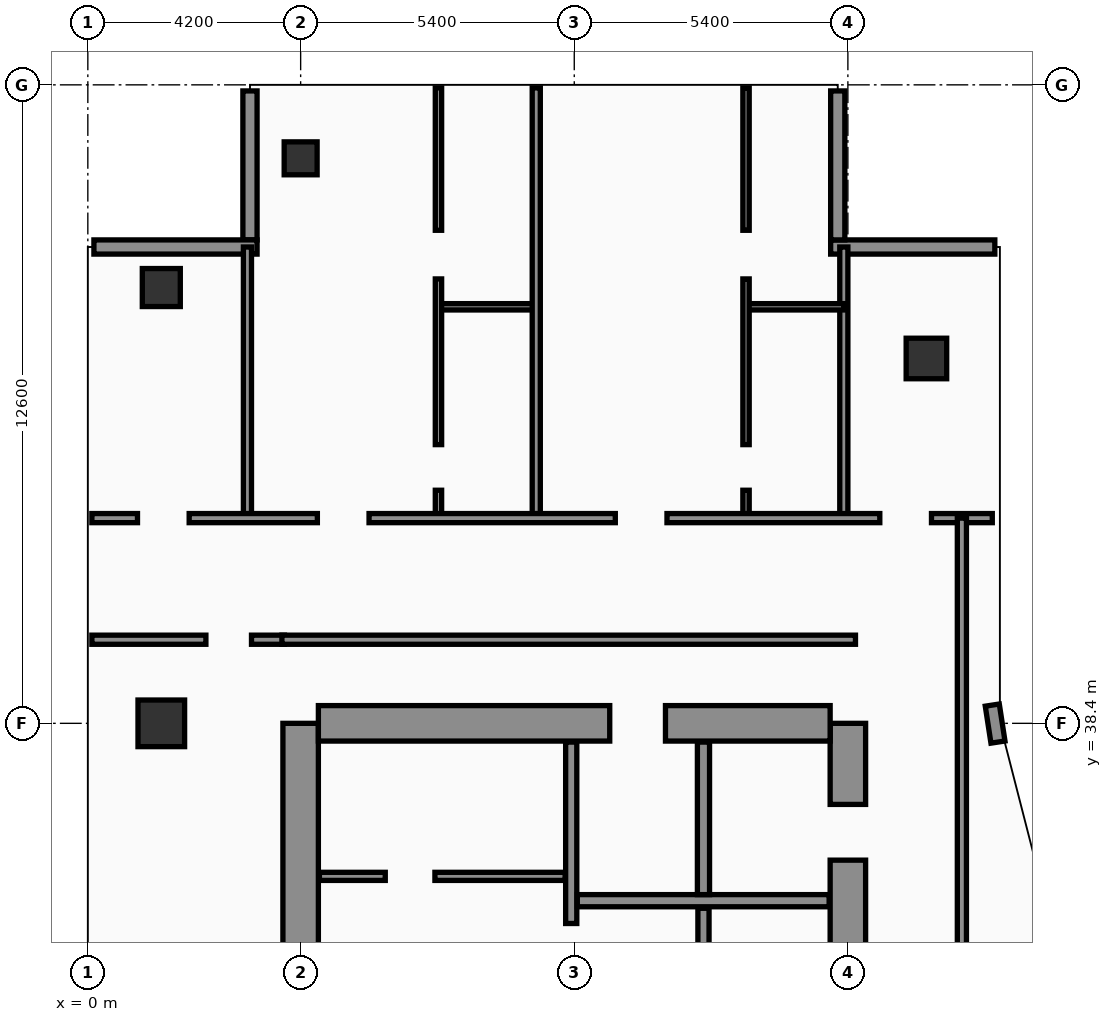
"""IFC4 building model, lengths in metres.
Left out: names, types, materials, properties, quantities, classifications, styles, units other than length and angle.
Written with IfcOpenShell. Run it as: python <this file> out.ifc"""

import sys

from ifc_helpers import new_model, si_unit, direction, frame, frame_2d, origin, origin_2d, place, context, subcontext, project, spatial, rectangle, hollow_rectangle, extrude, element, fill, save


model = new_model("IFC4")
c1 = context("Model", 3, precision=1e-05, world=origin(), true_north=direction((0.0, 1.0)))
c2 = subcontext(c1, "Body", "Model", "MODEL_VIEW")
j1 = project(units=[si_unit("LENGTHUNIT", "METRE"), si_unit("PLANEANGLEUNIT", "RADIAN")], contexts=[c1])
p1 = place(None, origin())
s1 = spatial("IfcSite", under=j1, at=p1, CompositionType="ELEMENT")
p2 = place(p1, origin())
s2 = spatial("IfcBuilding", under=s1, at=p2, CompositionType="ELEMENT")
p3 = place(p2, frame((0.0, 0.0, 251.4)))
s3 = spatial("IfcBuildingStorey", under=s2, at=p3, CompositionType="ELEMENT", Elevation=251.4)
p4 = place(p3, frame((4.2, 16.8, 0.0), z_axis=(0.0, 0.0, 1.0), x_axis=(0.0, 1.0, 0.0)))
e1 = element("IfcWall", 1, at=p4, inside=s3, PredefinedType="SHEAR", context=c2, shape_type="SweptSolid", body=[
    extrude(rectangle(XDim=21.6, YDim=0.7, at=frame_2d((10.8, 0.0))), origin(), (0.0, 0.0, 1.0), 3.56),
])
p5 = place(p3, frame((15.0, 16.8, 0.0), z_axis=(0.0, 0.0, 1.0), x_axis=(0.0, 1.0, 0.0)))
e2 = element("IfcWall", 2, at=p5, inside=s3, PredefinedType="SHEAR", context=c2, shape_type="SweptSolid", body=[
    extrude(rectangle(XDim=21.6, YDim=0.7, at=frame_2d((10.8, 0.0))), origin(), (0.0, 0.0, 1.0), 3.56),
])
p6 = place(p5, frame((8.65, 0.0, 0.0)))
e3 = element("IfcOpeningElement", 3, at=p6, cuts=e2, PredefinedType="OPENING", context=c2, shape_type="SweptSolid", body=[
    extrude(rectangle(XDim=1.1, YDim=2.2, at=frame_2d((0.55, 1.1))), frame((0.0, 0.36, 0.0), z_axis=(0.0, -1.0, 0.0), x_axis=(1.0, 0.0, 0.0)), (0.0, 0.0, 1.0), 0.72),
])
p7 = place(p5, frame((18.9, 0.0, 0.0)))
e4 = element("IfcOpeningElement", 4, at=p7, cuts=e2, PredefinedType="OPENING", context=c2, shape_type="SweptSolid", body=[
    extrude(rectangle(XDim=1.1, YDim=2.2, at=frame_2d((0.55, 1.1))), frame((0.0, 0.36, 0.0), z_axis=(0.0, -1.0, 0.0), x_axis=(1.0, 0.0, 0.0)), (0.0, 0.0, 1.0), 0.72),
])
p8 = place(p3, frame((4.55, 38.4, 0.0), z_axis=(0.0, 0.0, 1.0), x_axis=(1.0, 0.0, 0.0)))
e5 = element("IfcWall", 5, at=p8, inside=s3, PredefinedType="SHEAR", context=c2, shape_type="SweptSolid", body=[
    extrude(rectangle(XDim=10.1, YDim=0.7, at=frame_2d((5.05, 0.0))), origin(), (0.0, 0.0, 1.0), 3.56),
])
p9 = place(p8, frame((5.75, 0.0, 0.0)))
e6 = element("IfcOpeningElement", 6, at=p9, cuts=e5, PredefinedType="OPENING", context=c2, shape_type="SweptSolid", body=[
    extrude(rectangle(XDim=1.1, YDim=2.2, at=frame_2d((0.55, 1.1))), frame((0.0, 0.36, 0.0), z_axis=(0.0, -1.0, 0.0), x_axis=(1.0, 0.0, 0.0)), (0.0, 0.0, 1.0), 0.72),
])
p10 = place(p3, frame((1.45, 38.4, 0.0), z_axis=(0.0, 0.0, 1.0), x_axis=(1.0, 0.0, 0.0)))
e7 = element("IfcColumn", 7, at=p10, inside=s3, PredefinedType="COLUMN", context=c2, shape_type="SweptSolid", body=[
    extrude(rectangle(XDim=0.92, YDim=0.92, at=origin_2d()), origin(), (0.0, 0.0, 1.0), 3.56),
])
p11 = place(p3, frame((1.45, 47.0, 0.0), z_axis=(0.0, 0.0, 1.0), x_axis=(1.0, 0.0, 0.0)))
e8 = element("IfcColumn", 8, at=p11, inside=s3, PredefinedType="COLUMN", context=c2, shape_type="SweptSolid", body=[
    extrude(hollow_rectangle(XDim=0.75, YDim=0.75, WallThickness=0.032, at=origin_2d()), origin(), (0.0, 0.0, 1.0), 3.56),
])
p12 = place(p3, frame((4.2, 49.55, 0.0), z_axis=(0.0, 0.0, 1.0), x_axis=(1.0, 0.0, 0.0)))
e9 = element("IfcColumn", 9, at=p12, inside=s3, PredefinedType="COLUMN", context=c2, shape_type="SweptSolid", body=[
    extrude(hollow_rectangle(XDim=0.65, YDim=0.65, WallThickness=0.028, at=origin_2d()), origin(), (0.0, 0.0, 1.0), 3.56),
])
p13 = place(p3, frame((16.55, 45.6, 0.0), z_axis=(0.0, 0.0, 1.0), x_axis=(1.0, 0.0, 0.0)))
e10 = element("IfcColumn", 10, at=p13, inside=s3, PredefinedType="COLUMN", context=c2, shape_type="SweptSolid", body=[
    extrude(rectangle(XDim=0.8, YDim=0.8, at=origin_2d()), origin(), (0.0, 0.0, 1.0), 3.56),
])
p14 = place(p3, frame((17.962, 38.03, 0.0), z_axis=(0.0, 0.0, 1.0), x_axis=(-0.15141125477, 0.988470855377, 0.0)))
e11 = element("IfcWall", 11, at=p14, inside=s3, PredefinedType="SOLIDWALL", context=c2, shape_type="SweptSolid", body=[
    extrude(rectangle(XDim=0.739, YDim=0.28, at=frame_2d((0.369, 0.0))), origin(), (0.0, 0.0, 1.0), 3.56),
])
p15 = place(p3, frame((17.9, 47.8, 0.0), z_axis=(0.0, 0.0, 1.0), x_axis=(-1.0, 0.0, 0.0)))
e12 = element("IfcWall", 12, at=p15, inside=s3, PredefinedType="SOLIDWALL", context=c2, shape_type="SweptSolid", body=[
    extrude(rectangle(XDim=3.24, YDim=0.28, at=frame_2d((1.62, 0.0))), origin(), (0.0, 0.0, 1.0), 3.56),
])
p16 = place(p3, frame((14.8, 47.94, 0.0), z_axis=(0.0, 0.0, 1.0), x_axis=(0.0, 1.0, 0.0)))
e13 = element("IfcWall", 13, at=p16, inside=s3, PredefinedType="SOLIDWALL", context=c2, shape_type="SweptSolid", body=[
    extrude(rectangle(XDim=2.94, YDim=0.28, at=frame_2d((1.47, 0.0))), origin(), (0.0, 0.0, 1.0), 3.56),
])
p17 = place(p3, frame((3.2, 50.88, 0.0), z_axis=(0.0, 0.0, 1.0), x_axis=(0.0, -1.0, 0.0)))
e14 = element("IfcWall", 14, at=p17, inside=s3, PredefinedType="SOLIDWALL", context=c2, shape_type="SweptSolid", body=[
    extrude(rectangle(XDim=2.94, YDim=0.28, at=frame_2d((1.47, 0.0))), origin(), (0.0, 0.0, 1.0), 3.09),
])
p18 = place(p3, frame((3.34, 47.8, 0.0), z_axis=(0.0, 0.0, 1.0), x_axis=(-1.0, 0.0, 0.0)))
e15 = element("IfcWall", 15, at=p18, inside=s3, PredefinedType="SOLIDWALL", context=c2, shape_type="SweptSolid", body=[
    extrude(rectangle(XDim=3.22, YDim=0.28, at=frame_2d((1.61, 0.0))), origin(), (0.0, 0.0, 1.0), 3.09),
])
p19 = place(p3, frame((4.57, 35.38, 0.0), z_axis=(0.0, 0.0, 1.0), x_axis=(1.0, 0.0, 0.0)))
e16 = element("IfcWall", 16, at=p19, inside=s3, PredefinedType="PARTITIONING", context=c2, shape_type="SweptSolid", body=[
    extrude(rectangle(XDim=4.85, YDim=0.16, at=frame_2d((2.425, 0.0))), origin(), (0.0, 0.0, 1.0), 3.56),
])
p20 = place(p19, frame((1.3, 0.0, 0.0)))
e17 = element("IfcOpeningElement", 17, at=p20, cuts=e16, PredefinedType="OPENING", context=c2, shape_type="SweptSolid", body=[
    extrude(rectangle(XDim=0.98, YDim=2.15, at=frame_2d((0.49, 1.075))), frame((0.0, 0.09, 0.0), z_axis=(0.0, -1.0, 0.0), x_axis=(1.0, 0.0, 0.0)), (0.0, 0.0, 1.0), 0.18),
])
p21 = place(p3, frame((9.54, 32.92, 0.0), z_axis=(0.0, 0.0, 1.0), x_axis=(0.0, 1.0, 0.0)))
e18 = element("IfcWall", 18, at=p21, inside=s3, PredefinedType="SOLIDWALL", context=c2, shape_type="SweptSolid", body=[
    extrude(rectangle(XDim=5.11, YDim=0.22, at=frame_2d((2.555, 0.0))), origin(), (0.0, 0.0, 1.0), 3.56),
])
p22 = place(p21, frame((0.55, 0.0, 0.0)))
e19 = element("IfcOpeningElement", 19, at=p22, cuts=e18, PredefinedType="OPENING", context=c2, shape_type="SweptSolid", body=[
    extrude(rectangle(XDim=0.98, YDim=2.15, at=frame_2d((0.49, 1.075))), frame((0.0, 0.12, 0.0), z_axis=(0.0, -1.0, 0.0), x_axis=(1.0, 0.0, 0.0)), (0.0, 0.0, 1.0), 0.24),
])
p23 = place(p3, frame((12.15, 27.0, 0.0), z_axis=(0.0, 0.0, 1.0), x_axis=(0.0, 1.0, 0.0)))
e20 = element("IfcWall", 20, at=p23, inside=s3, PredefinedType="SOLIDWALL", context=c2, shape_type="SweptSolid", body=[
    extrude(rectangle(XDim=7.75, YDim=0.22, at=frame_2d((3.875, 0.0))), origin(), (0.0, 0.0, 1.0), 3.56),
])
p24 = place(p23, frame((0.8, 0.0, 0.0)))
e21 = element("IfcOpeningElement", 21, at=p24, cuts=e20, PredefinedType="OPENING", context=c2, shape_type="SweptSolid", body=[
    extrude(rectangle(XDim=0.98, YDim=2.15, at=frame_2d((0.49, 1.075))), frame((0.0, 0.12, 0.0), z_axis=(0.0, -1.0, 0.0), x_axis=(1.0, 0.0, 0.0)), (0.0, 0.0, 1.0), 0.24),
])
p25 = place(p3, frame((9.66, 34.9, 0.0), z_axis=(0.0, 0.0, 1.0), x_axis=(1.0, 0.0, 0.0)))
e22 = element("IfcWall", 22, at=p25, inside=s3, PredefinedType="SOLIDWALL", context=c2, shape_type="SweptSolid", body=[
    extrude(rectangle(XDim=4.97, YDim=0.24, at=frame_2d((2.485, 0.0))), origin(), (0.0, 0.0, 1.0), 3.56),
])
p26 = place(p3, frame((12.15, 35.02, 0.0), z_axis=(0.0, 0.0, 1.0), x_axis=(0.0, 1.0, 0.0)))
e23 = element("IfcWall", 23, at=p26, inside=s3, PredefinedType="SOLIDWALL", context=c2, shape_type="SweptSolid", body=[
    extrude(rectangle(XDim=3.01, YDim=0.24, at=frame_2d((1.505, 0.0))), origin(), (0.0, 0.0, 1.0), 3.56),
])
p27 = place(p3, frame((0.08, 40.05, 0.0), z_axis=(0.0, 0.0, 1.0), x_axis=(1.0, 0.0, 0.0)))
e24 = element("IfcWall", 24, at=p27, inside=s3, PredefinedType="PARTITIONING", context=c2, shape_type="SweptSolid", body=[
    extrude(rectangle(XDim=3.8, YDim=0.18, at=frame_2d((1.9, 0.0))), origin(), (0.0, 0.0, 1.0), 2.99),
])
p28 = place(p27, frame((2.25, 0.0, 0.0)))
e25 = element("IfcOpeningElement", 25, at=p28, cuts=e24, PredefinedType="OPENING", context=c2, shape_type="SweptSolid", body=[
    extrude(rectangle(XDim=0.9, YDim=2.15, at=frame_2d((0.45, 1.075))), frame((0.0, 0.1, 0.0), z_axis=(0.0, -1.0, 0.0), x_axis=(1.0, 0.0, 0.0)), (0.0, 0.0, 1.0), 0.2),
])
p29 = place(p3, frame((3.15, 42.45, 0.0), z_axis=(0.0, 0.0, 1.0), x_axis=(0.0, 1.0, 0.0)))
e26 = element("IfcWall", 26, at=p29, inside=s3, PredefinedType="PARTITIONING", context=c2, shape_type="SweptSolid", body=[
    extrude(rectangle(XDim=5.35, YDim=0.16, at=frame_2d((2.675, 0.0))), origin(), (0.0, 0.0, 1.0), 3.14),
])
p30 = place(p3, frame((14.92, 42.45, 0.0), z_axis=(0.0, 0.0, 1.0), x_axis=(0.0, 1.0, 0.0)))
e27 = element("IfcWall", 27, at=p30, inside=s3, PredefinedType="PARTITIONING", context=c2, shape_type="SweptSolid", body=[
    extrude(rectangle(XDim=5.35, YDim=0.16, at=frame_2d((2.675, 0.0))), origin(), (0.0, 0.0, 1.0), 3.09),
])
p31 = place(p3, frame((6.92, 46.62, 0.0), z_axis=(0.0, 0.0, 1.0), x_axis=(1.0, 0.0, 0.0)))
e28 = element("IfcWall", 28, at=p31, inside=s3, PredefinedType="PARTITIONING", context=c2, shape_type="SweptSolid", body=[
    extrude(rectangle(XDim=1.93, YDim=0.125, at=frame_2d((0.965, 0.0))), origin(), (0.0, 0.0, 1.0), 3.56),
])
p32 = place(p3, frame((6.92, 42.45, 0.0), z_axis=(0.0, 0.0, 1.0), x_axis=(0.0, 1.0, 0.0)))
e29 = element("IfcWall", 29, at=p32, inside=s3, PredefinedType="PARTITIONING", context=c2, shape_type="SweptSolid", body=[
    extrude(rectangle(XDim=8.49, YDim=0.125, at=frame_2d((4.245, 0.0))), origin(), (0.0, 0.0, 1.0), 3.09),
])
p33 = place(p32, frame((0.55, 0.0, 0.0)))
e30 = element("IfcOpeningElement", 30, at=p33, cuts=e29, PredefinedType="OPENING", context=c2, shape_type="SweptSolid", body=[
    extrude(rectangle(XDim=0.9, YDim=2.15, at=frame_2d((0.45, 1.075))), frame((0.0, 0.073, 0.0), z_axis=(0.0, -1.0, 0.0), x_axis=(1.0, 0.0, 0.0)), (0.0, 0.0, 1.0), 0.145),
])
p34 = place(p32, frame((4.72, 0.0, 0.0)))
e31 = element("IfcOpeningElement", 31, at=p34, cuts=e29, PredefinedType="OPENING", context=c2, shape_type="SweptSolid", body=[
    extrude(rectangle(XDim=0.96, YDim=2.2, at=frame_2d((0.48, 1.1))), frame((0.0, 0.073, 0.0), z_axis=(0.0, -1.0, 0.0), x_axis=(1.0, 0.0, 0.0)), (0.0, 0.0, 1.0), 0.145),
])
p35 = place(p3, frame((12.99, 46.62, 0.0), z_axis=(0.0, 0.0, 1.0), x_axis=(1.0, 0.0, 0.0)))
e32 = element("IfcWall", 32, at=p35, inside=s3, PredefinedType="PARTITIONING", context=c2, shape_type="SweptSolid", body=[
    extrude(rectangle(XDim=1.93, YDim=0.125, at=frame_2d((0.965, 0.0))), origin(), (0.0, 0.0, 1.0), 3.09),
])
p36 = place(p3, frame((12.99, 42.45, 0.0), z_axis=(0.0, 0.0, 1.0), x_axis=(0.0, 1.0, 0.0)))
e33 = element("IfcWall", 33, at=p36, inside=s3, PredefinedType="PARTITIONING", context=c2, shape_type="SweptSolid", body=[
    extrude(rectangle(XDim=8.49, YDim=0.125, at=frame_2d((4.245, 0.0))), origin(), (0.0, 0.0, 1.0), 3.09),
])
p37 = place(p36, frame((0.55, 0.0, 0.0)))
e34 = element("IfcOpeningElement", 34, at=p37, cuts=e33, PredefinedType="OPENING", context=c2, shape_type="SweptSolid", body=[
    extrude(rectangle(XDim=0.9, YDim=2.15, at=frame_2d((0.45, 1.075))), frame((0.0, 0.073, 0.0), z_axis=(0.0, -1.0, 0.0), x_axis=(1.0, 0.0, 0.0)), (0.0, 0.0, 1.0), 0.145),
])
p38 = place(p36, frame((4.72, 0.0, 0.0)))
e35 = element("IfcOpeningElement", 35, at=p38, cuts=e33, PredefinedType="OPENING", context=c2, shape_type="SweptSolid", body=[
    extrude(rectangle(XDim=0.96, YDim=2.2, at=frame_2d((0.48, 1.1))), frame((0.0, 0.073, 0.0), z_axis=(0.0, -1.0, 0.0), x_axis=(1.0, 0.0, 0.0)), (0.0, 0.0, 1.0), 0.145),
])
p39 = place(p3, frame((8.85, 42.45, 0.0), z_axis=(0.0, 0.0, 1.0), x_axis=(0.0, 1.0, 0.0)))
e36 = element("IfcWall", 36, at=p39, inside=s3, PredefinedType="PARTITIONING", context=c2, shape_type="SweptSolid", body=[
    extrude(rectangle(XDim=8.49, YDim=0.16, at=frame_2d((4.245, 0.0))), origin(), (0.0, 0.0, 1.0), 3.09),
])
p40 = place(p3, frame((0.08, 42.45, 0.0), z_axis=(0.0, 0.0, 1.0), x_axis=(1.0, 0.0, 0.0)))
e37 = element("IfcWall", 37, at=p40, inside=s3, PredefinedType="PARTITIONING", context=c2, shape_type="SweptSolid", body=[
    extrude(rectangle(XDim=17.77, YDim=0.18, at=frame_2d((8.885, 0.0))), origin(), (0.0, 0.0, 1.0), 2.99),
])
p41 = place(p40, frame((0.9, 0.0, 0.0)))
e38 = element("IfcOpeningElement", 38, at=p41, cuts=e37, PredefinedType="OPENING", context=c2, shape_type="SweptSolid", body=[
    extrude(rectangle(XDim=1.02, YDim=2.2, at=frame_2d((0.51, 1.1))), frame((0.0, 0.1, 0.0), z_axis=(0.0, -1.0, 0.0), x_axis=(1.0, 0.0, 0.0)), (0.0, 0.0, 1.0), 0.2),
])
p42 = place(p40, frame((4.45, 0.0, 0.0)))
e39 = element("IfcOpeningElement", 39, at=p42, cuts=e37, PredefinedType="OPENING", context=c2, shape_type="SweptSolid", body=[
    extrude(rectangle(XDim=1.02, YDim=2.2, at=frame_2d((0.51, 1.1))), frame((0.0, 0.1, 0.0), z_axis=(0.0, -1.0, 0.0), x_axis=(1.0, 0.0, 0.0)), (0.0, 0.0, 1.0), 0.2),
])
p43 = place(p40, frame((10.33, 0.0, 0.0)))
e40 = element("IfcOpeningElement", 40, at=p43, cuts=e37, PredefinedType="OPENING", context=c2, shape_type="SweptSolid", body=[
    extrude(rectangle(XDim=1.02, YDim=2.2, at=frame_2d((0.51, 1.1))), frame((0.0, 0.1, 0.0), z_axis=(0.0, -1.0, 0.0), x_axis=(1.0, 0.0, 0.0)), (0.0, 0.0, 1.0), 0.2),
])
p44 = place(p40, frame((15.55, 0.0, 0.0)))
e41 = element("IfcOpeningElement", 41, at=p44, cuts=e37, PredefinedType="OPENING", context=c2, shape_type="SweptSolid", body=[
    extrude(rectangle(XDim=1.02, YDim=2.2, at=frame_2d((0.51, 1.1))), frame((0.0, 0.1, 0.0), z_axis=(0.0, -1.0, 0.0), x_axis=(1.0, 0.0, 0.0)), (0.0, 0.0, 1.0), 0.2),
])
p45 = place(p3, frame((17.25, 24.3, 0.0), z_axis=(0.0, 0.0, 1.0), x_axis=(0.0, 1.0, 0.0)))
e42 = element("IfcWall", 42, at=p45, inside=s3, PredefinedType="PARTITIONING", context=c2, shape_type="SweptSolid", body=[
    extrude(rectangle(XDim=18.15, YDim=0.18, at=frame_2d((9.075, 0.0))), origin(), (0.0, 0.0, 1.0), 2.99),
])
p46 = place(p45, frame((3.2, 0.0, 0.0)))
e43 = element("IfcOpeningElement", 43, at=p46, cuts=e42, PredefinedType="OPENING", context=c2, shape_type="SweptSolid", body=[
    extrude(rectangle(XDim=1.02, YDim=2.2, at=frame_2d((0.51, 1.1))), frame((0.0, 0.1, 0.0), z_axis=(0.0, -1.0, 0.0), x_axis=(1.0, 0.0, 0.0)), (0.0, 0.0, 1.0), 0.2),
])
p47 = place(p3, frame((3.83, 40.05, 0.0), z_axis=(0.0, 0.0, 1.0), x_axis=(1.0, 0.0, 0.0)))
e44 = element("IfcWall", 44, at=p47, inside=s3, PredefinedType="PARTITIONING", context=c2, shape_type="SweptSolid", body=[
    extrude(rectangle(XDim=11.32, YDim=0.18, at=frame_2d((5.66, 0.0))), origin(), (0.0, 0.0, 1.0), 2.99),
])
p48 = place(p20, origin())
e45 = element("IfcDoor", 45, at=p48, inside=s3, OperationType="SINGLE_SWING_RIGHT", PredefinedType="DOOR", context=c2, shape_type="SweptSolid", body=[
    extrude(rectangle(XDim=0.98, YDim=2.15, at=frame_2d((0.49, 1.075))), frame((0.0, 0.025, 0.0), z_axis=(0.0, -1.0, 0.0), x_axis=(1.0, 0.0, 0.0)), (0.0, 0.0, 1.0), 0.05),
])
fill(e17, e45)
p49 = place(p22, origin())
e46 = element("IfcDoor", 46, at=p49, inside=s3, OperationType="SINGLE_SWING_LEFT", PredefinedType="DOOR", context=c2, shape_type="SweptSolid", body=[
    extrude(rectangle(XDim=0.98, YDim=2.15, at=frame_2d((0.49, 1.075))), frame((0.0, 0.025, 0.0), z_axis=(0.0, -1.0, 0.0), x_axis=(1.0, 0.0, 0.0)), (0.0, 0.0, 1.0), 0.05),
])
fill(e19, e46)
p50 = place(p28, origin())
e47 = element("IfcDoor", 47, at=p50, inside=s3, OperationType="SINGLE_SWING_LEFT", PredefinedType="DOOR", context=c2, shape_type="SweptSolid", body=[
    extrude(rectangle(XDim=0.9, YDim=2.15, at=frame_2d((0.45, 1.075))), frame((0.0, 0.025, 0.0), z_axis=(0.0, -1.0, 0.0), x_axis=(1.0, 0.0, 0.0)), (0.0, 0.0, 1.0), 0.05),
])
fill(e25, e47)
p51 = place(p33, origin())
e48 = element("IfcDoor", 48, at=p51, inside=s3, OperationType="SINGLE_SWING_LEFT", PredefinedType="DOOR", context=c2, shape_type="SweptSolid", body=[
    extrude(rectangle(XDim=0.9, YDim=2.15, at=frame_2d((0.45, 1.075))), frame((0.0, 0.025, 0.0), z_axis=(0.0, -1.0, 0.0), x_axis=(1.0, 0.0, 0.0)), (0.0, 0.0, 1.0), 0.05),
])
fill(e30, e48)
p52 = place(p34, origin())
e49 = element("IfcDoor", 49, at=p52, inside=s3, OperationType="SINGLE_SWING_RIGHT", PredefinedType="DOOR", context=c2, shape_type="SweptSolid", body=[
    extrude(rectangle(XDim=0.96, YDim=2.2, at=frame_2d((0.48, 1.1))), frame((0.0, 0.025, 0.0), z_axis=(0.0, -1.0, 0.0), x_axis=(1.0, 0.0, 0.0)), (0.0, 0.0, 1.0), 0.05),
])
fill(e31, e49)
p53 = place(p37, origin())
e50 = element("IfcDoor", 50, at=p53, inside=s3, OperationType="SINGLE_SWING_LEFT", PredefinedType="DOOR", context=c2, shape_type="SweptSolid", body=[
    extrude(rectangle(XDim=0.9, YDim=2.15, at=frame_2d((0.45, 1.075))), frame((0.0, 0.025, 0.0), z_axis=(0.0, -1.0, 0.0), x_axis=(1.0, 0.0, 0.0)), (0.0, 0.0, 1.0), 0.05),
])
fill(e34, e50)
p54 = place(p38, origin())
e51 = element("IfcDoor", 51, at=p54, inside=s3, OperationType="SINGLE_SWING_RIGHT", PredefinedType="DOOR", context=c2, shape_type="SweptSolid", body=[
    extrude(rectangle(XDim=0.96, YDim=2.2, at=frame_2d((0.48, 1.1))), frame((0.0, 0.025, 0.0), z_axis=(0.0, -1.0, 0.0), x_axis=(1.0, 0.0, 0.0)), (0.0, 0.0, 1.0), 0.05),
])
fill(e35, e51)
p55 = place(p41, origin())
e52 = element("IfcDoor", 52, at=p55, inside=s3, OperationType="SINGLE_SWING_LEFT", PredefinedType="DOOR", context=c2, shape_type="SweptSolid", body=[
    extrude(rectangle(XDim=1.02, YDim=2.2, at=frame_2d((0.51, 1.1))), frame((0.0, 0.025, 0.0), z_axis=(0.0, -1.0, 0.0), x_axis=(1.0, 0.0, 0.0)), (0.0, 0.0, 1.0), 0.05),
])
fill(e38, e52)
p56 = place(p42, origin())
e53 = element("IfcDoor", 53, at=p56, inside=s3, OperationType="SINGLE_SWING_RIGHT", PredefinedType="DOOR", context=c2, shape_type="SweptSolid", body=[
    extrude(rectangle(XDim=1.02, YDim=2.2, at=frame_2d((0.51, 1.1))), frame((0.0, 0.025, 0.0), z_axis=(0.0, -1.0, 0.0), x_axis=(1.0, 0.0, 0.0)), (0.0, 0.0, 1.0), 0.05),
])
fill(e39, e53)
p57 = place(p43, origin())
e54 = element("IfcDoor", 54, at=p57, inside=s3, OperationType="SINGLE_SWING_LEFT", PredefinedType="DOOR", context=c2, shape_type="SweptSolid", body=[
    extrude(rectangle(XDim=1.02, YDim=2.2, at=frame_2d((0.51, 1.1))), frame((0.0, 0.025, 0.0), z_axis=(0.0, -1.0, 0.0), x_axis=(1.0, 0.0, 0.0)), (0.0, 0.0, 1.0), 0.05),
])
fill(e40, e54)
p58 = place(p44, origin())
e55 = element("IfcDoor", 55, at=p58, inside=s3, OperationType="SINGLE_SWING_RIGHT", PredefinedType="DOOR", context=c2, shape_type="SweptSolid", body=[
    extrude(rectangle(XDim=1.02, YDim=2.2, at=frame_2d((0.51, 1.1))), frame((0.0, 0.025, 0.0), z_axis=(0.0, -1.0, 0.0), x_axis=(1.0, 0.0, 0.0)), (0.0, 0.0, 1.0), 0.05),
])
fill(e41, e55)
p59 = place(p7, origin())
e56 = element("IfcDoor", 56, at=p59, inside=s3, OperationType="DOUBLE_DOOR_SLIDING", PredefinedType="DOOR", context=c2, shape_type="SweptSolid", body=[
    extrude(rectangle(XDim=1.1, YDim=2.2, at=frame_2d((0.55, 1.1))), frame((0.0, 0.025, 0.0), z_axis=(0.0, -1.0, 0.0), x_axis=(1.0, 0.0, 0.0)), (0.0, 0.0, 1.0), 0.05),
])
fill(e4, e56)
p60 = place(p9, origin())
e57 = element("IfcDoor", 57, at=p60, inside=s3, OperationType="DOUBLE_DOOR_SLIDING", PredefinedType="DOOR", context=c2, shape_type="SweptSolid", body=[
    extrude(rectangle(XDim=1.1, YDim=2.2, at=frame_2d((0.55, 1.1))), frame((0.0, 0.025, 0.0), z_axis=(0.0, -1.0, 0.0), x_axis=(1.0, 0.0, 0.0)), (0.0, 0.0, 1.0), 0.05),
])
fill(e6, e57)
save(model, sys.argv[1])
